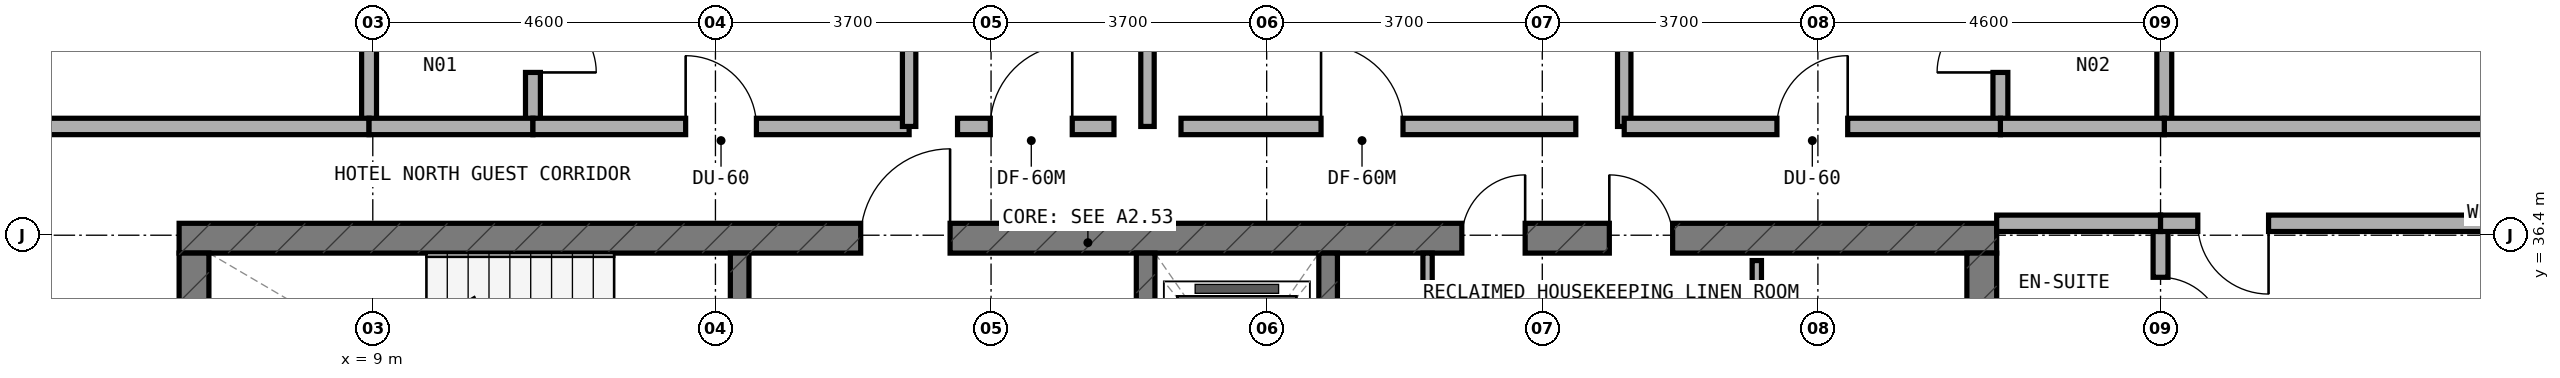
"""IFC4 building model, lengths in metres.
Left out: names, types, materials, properties, quantities, classifications, styles, units other than length and angle.
Written with IfcOpenShell. Run it as: python <this file> out.ifc"""

import sys

from ifc_helpers import new_model, si_unit, direction, frame, frame_2d, origin, place, context, subcontext, project, spatial, rectangle, extrude, element, fill, save


model = new_model("IFC4")
c1 = context("Model", 3, precision=1e-05, world=origin(), true_north=direction((0.0, 1.0)))
c2 = subcontext(c1, "Body", "Model", "MODEL_VIEW")
j1 = project(units=[si_unit("LENGTHUNIT", "METRE"), si_unit("PLANEANGLEUNIT", "RADIAN")], contexts=[c1])
p1 = place(None, origin())
s1 = spatial("IfcSite", under=j1, at=p1, CompositionType="ELEMENT")
p2 = place(p1, origin())
s2 = spatial("IfcBuilding", under=s1, at=p2, CompositionType="ELEMENT")
p3 = place(p2, frame((0.0, 0.0, 246.8)))
s3 = spatial("IfcBuildingStorey", under=s2, at=p3, CompositionType="ELEMENT", Elevation=246.8)
p4 = place(p3, frame((6.4, 36.36, 0.0), z_axis=(0.0, 0.0, 1.0), x_axis=(1.0, 0.0, 0.0)))
e1 = element("IfcWall", 1, at=p4, inside=s3, PredefinedType="SHEAR", context=c2, shape_type="SweptSolid", body=[
    extrude(rectangle(XDim=24.4, YDim=0.4, at=frame_2d((12.2, 0.0))), origin(), (0.0, 0.0, 1.0), 3.6),
])
p5 = place(p4, frame((9.15, 0.0, 0.0)))
e2 = element("IfcOpeningElement", 2, at=p5, cuts=e1, PredefinedType="OPENING", context=c2, shape_type="SweptSolid", body=[
    extrude(rectangle(XDim=1.2, YDim=2.15, at=frame_2d((0.6, 1.075))), frame((0.0, 0.21, 0.0), z_axis=(0.0, -1.0, 0.0), x_axis=(1.0, 0.0, 0.0)), (0.0, 0.0, 1.0), 0.42),
])
p6 = place(p4, frame((19.2, 0.0, 0.0)))
e3 = element("IfcOpeningElement", 3, at=p6, cuts=e1, PredefinedType="OPENING", context=c2, shape_type="SweptSolid", body=[
    extrude(rectangle(XDim=0.85, YDim=2.1, at=frame_2d((0.425, 1.05))), frame((0.0, 0.21, 0.0), z_axis=(0.0, -1.0, 0.0), x_axis=(1.0, 0.0, 0.0)), (0.0, 0.0, 1.0), 0.42),
])
p7 = place(p4, frame((17.22, 0.0, 0.0)))
e4 = element("IfcOpeningElement", 4, at=p7, cuts=e1, PredefinedType="OPENING", context=c2, shape_type="SweptSolid", body=[
    extrude(rectangle(XDim=0.85, YDim=2.1, at=frame_2d((0.425, 1.05))), frame((0.0, 0.21, 0.0), z_axis=(0.0, -1.0, 0.0), x_axis=(1.0, 0.0, 0.0)), (0.0, 0.0, 1.0), 0.42),
])
for number, where, z_axis, x_axis in (
    (5, (6.6, 33.0, 0.0), (0.0, 0.0, 1.0), (0.0, 1.0, 0.0)),
    (6, (30.6, 33.0, 0.0), (0.0, 0.0, 1.0), (0.0, 1.0, 0.0)),
):
    element("IfcWall", number, at=place(p3, frame(where, z_axis=z_axis, x_axis=x_axis)), inside=s3, PredefinedType="SHEAR", context=c2, shape_type="SweptSolid", body=[
        extrude(rectangle(XDim=3.16, YDim=0.4, at=frame_2d((1.58, 0.0))), origin(), (0.0, 0.0, 1.0), 3.6),
    ])
p8 = place(p3, frame((13.925, 33.0, 0.0), z_axis=(0.0, 0.0, 1.0), x_axis=(0.0, 1.0, 0.0)))
e7 = element("IfcWall", 7, at=p8, inside=s3, PredefinedType="STANDARD", context=c2, shape_type="SweptSolid", body=[
    extrude(rectangle(XDim=3.16, YDim=0.25, at=frame_2d((1.58, 0.0))), origin(), (0.0, 0.0, 1.0), 3.32),
])
p9 = place(p8, frame((0.98, 0.0, 0.0)))
e8 = element("IfcOpeningElement", 8, at=p9, cuts=e7, PredefinedType="OPENING", context=c2, shape_type="SweptSolid", body=[
    extrude(rectangle(XDim=1.1, YDim=2.15, at=frame_2d((0.55, 1.075))), frame((0.0, 0.135, 0.0), z_axis=(0.0, -1.0, 0.0), x_axis=(1.0, 0.0, 0.0)), (0.0, 0.0, 1.0), 0.27),
])
p10 = place(p3, frame((19.375, 33.0, 0.0), z_axis=(0.0, 0.0, 1.0), x_axis=(0.0, 1.0, 0.0)))
e9 = element("IfcWall", 9, at=p10, inside=s3, PredefinedType="STANDARD", context=c2, shape_type="SweptSolid", body=[
    extrude(rectangle(XDim=3.16, YDim=0.25, at=frame_2d((1.58, 0.0))), origin(), (0.0, 0.0, 1.0), 3.32),
])
p11 = place(p10, frame((0.98, 0.0, 0.0)))
e10 = element("IfcOpeningElement", 10, at=p11, cuts=e9, PredefinedType="OPENING", context=c2, shape_type="SweptSolid", body=[
    extrude(rectangle(XDim=1.1, YDim=2.15, at=frame_2d((0.55, 1.075))), frame((0.0, 0.135, 0.0), z_axis=(0.0, -1.0, 0.0), x_axis=(1.0, 0.0, 0.0)), (0.0, 0.0, 1.0), 0.27),
])
p12 = place(p3, frame((21.825, 33.0, 0.0), z_axis=(0.0, 0.0, 1.0), x_axis=(0.0, 1.0, 0.0)))
e11 = element("IfcWall", 11, at=p12, inside=s3, PredefinedType="STANDARD", context=c2, shape_type="SweptSolid", body=[
    extrude(rectangle(XDim=3.16, YDim=0.25, at=frame_2d((1.58, 0.0))), origin(), (0.0, 0.0, 1.0), 3.32),
])
p13 = place(p3, frame((27.58, 33.1, 0.0), z_axis=(0.0, 0.0, 1.0), x_axis=(0.0, 1.0, 0.0)))
e12 = element("IfcWall", 12, at=p13, inside=s3, PredefinedType="PARTITIONING", context=c2, shape_type="SweptSolid", body=[
    extrude(rectangle(XDim=2.96, YDim=0.125, at=frame_2d((1.48, 0.0))), origin(), (0.0, 0.0, 1.0), 3.32),
])
p14 = place(p13, frame((1.055, 0.0, 0.0)))
e13 = element("IfcOpeningElement", 13, at=p14, cuts=e12, PredefinedType="OPENING", context=c2, shape_type="SweptSolid", body=[
    extrude(rectangle(XDim=0.85, YDim=2.1, at=frame_2d((0.425, 1.05))), frame((0.0, 0.073, 0.0), z_axis=(0.0, -1.0, 0.0), x_axis=(1.0, 0.0, 0.0)), (0.0, 0.0, 1.0), 0.145),
])
p15 = place(p3, frame((23.16, 34.82, 0.0), z_axis=(0.0, 0.0, 1.0), x_axis=(0.0, 1.0, 0.0)))
e14 = element("IfcWall", 14, at=p15, inside=s3, PredefinedType="PARTITIONING", context=c2, shape_type="SweptSolid", body=[
    extrude(rectangle(XDim=1.34, YDim=0.125, at=frame_2d((0.67, 0.0))), origin(), (0.0, 0.0, 1.0), 3.32),
])
p16 = place(p3, frame((11.15, 37.96, 0.0), z_axis=(0.0, 0.0, 1.0), x_axis=(0.0, 1.0, 0.0)))
e15 = element("IfcWall", 15, at=p16, inside=s3, PredefinedType="PLUMBINGWALL", context=c2, shape_type="SweptSolid", body=[
    extrude(rectangle(XDim=2.1, YDim=0.2, at=frame_2d((1.05, 0.0))), origin(), (0.0, 0.0, 1.0), 3.025),
])
p17 = place(p16, frame((0.625, 0.0, 0.0)))
e16 = element("IfcOpeningElement", 16, at=p17, cuts=e15, PredefinedType="OPENING", context=c2, shape_type="SweptSolid", body=[
    extrude(rectangle(XDim=0.85, YDim=2.1, at=frame_2d((0.425, 1.05))), frame((0.0, 0.11, 0.0), z_axis=(0.0, -1.0, 0.0), x_axis=(1.0, 0.0, 0.0)), (0.0, 0.0, 1.0), 0.22),
])
p18 = place(p3, frame((8.95, 37.96, 0.0), z_axis=(0.0, 0.0, 1.0), x_axis=(0.0, 1.0, 0.0)))
e17 = element("IfcWall", 17, at=p18, inside=s3, PredefinedType="PLUMBINGWALL", context=c2, shape_type="SweptSolid", body=[
    extrude(rectangle(XDim=2.1, YDim=0.2, at=frame_2d((1.05, 0.0))), origin(), (0.0, 0.0, 1.0), 3.025),
])
p19 = place(p3, frame((2.76, 37.86, 0.0), z_axis=(0.0, 0.0, 1.0), x_axis=(1.0, 0.0, 0.0)))
e18 = element("IfcWall", 18, at=p19, inside=s3, PredefinedType="SOLIDWALL", context=c2, shape_type="SweptSolid", body=[
    extrude(rectangle(XDim=6.19, YDim=0.22, at=frame_2d((3.095, 0.0))), origin(), (0.0, 0.0, 1.0), 2.745),
])
p20 = place(p3, frame((8.95, 37.86, 0.0), z_axis=(0.0, 0.0, 1.0), x_axis=(1.0, 0.0, 0.0)))
e19 = element("IfcWall", 19, at=p20, inside=s3, PredefinedType="SOLIDWALL", context=c2, shape_type="SweptSolid", body=[
    extrude(rectangle(XDim=2.2, YDim=0.22, at=frame_2d((1.1, 0.0))), origin(), (0.0, 0.0, 1.0), 3.32),
])
p21 = place(p3, frame((11.15, 37.86, 0.0), z_axis=(0.0, 0.0, 1.0), x_axis=(1.0, 0.0, 0.0)))
e20 = element("IfcWall", 20, at=p21, inside=s3, PredefinedType="SOLIDWALL", context=c2, shape_type="SweptSolid", body=[
    extrude(rectangle(XDim=5.05, YDim=0.22, at=frame_2d((2.525, 0.0))), origin(), (0.0, 0.0, 1.0), 2.745),
])
p22 = place(p21, frame((2.05, 0.0, 0.0)))
e21 = element("IfcOpeningElement", 21, at=p22, cuts=e20, PredefinedType="OPENING", context=c2, shape_type="SweptSolid", body=[
    extrude(rectangle(XDim=0.95, YDim=2.1, at=frame_2d((0.475, 1.05))), frame((0.0, 0.12, 0.0), z_axis=(0.0, -1.0, 0.0), x_axis=(1.0, 0.0, 0.0)), (0.0, 0.0, 1.0), 0.24),
])
p23 = place(p3, frame((16.2, 37.86, 0.0), z_axis=(0.0, 0.0, 1.0), x_axis=(0.0, 1.0, 0.0)))
e22 = element("IfcWall", 22, at=p23, inside=s3, PredefinedType="SOLIDWALL", context=c2, shape_type="SweptSolid", body=[
    extrude(rectangle(XDim=5.68, YDim=0.18, at=frame_2d((2.84, 0.0))), origin(), (0.0, 0.0, 1.0), 2.745),
])
p24 = place(p3, frame((19.4, 37.86, 0.0), z_axis=(0.0, 0.0, 1.0), x_axis=(0.0, 1.0, 0.0)))
e23 = element("IfcWall", 23, at=p24, inside=s3, PredefinedType="SOLIDWALL", context=c2, shape_type="SweptSolid", body=[
    extrude(rectangle(XDim=5.68, YDim=0.18, at=frame_2d((2.84, 0.0))), origin(), (0.0, 0.0, 1.0), 3.015),
])
p25 = place(p3, frame((16.85, 37.86, 0.0), z_axis=(0.0, 0.0, 1.0), x_axis=(1.0, 0.0, 0.0)))
e24 = element("IfcWall", 24, at=p25, inside=s3, PredefinedType="SOLIDWALL", context=c2, shape_type="SweptSolid", body=[
    extrude(rectangle(XDim=2.1, YDim=0.22, at=frame_2d((1.05, 0.0))), origin(), (0.0, 0.0, 1.0), 3.32),
])
p26 = place(p25, frame((0.44, 0.0, 0.0)))
e25 = element("IfcOpeningElement", 25, at=p26, cuts=e24, PredefinedType="OPENING", context=c2, shape_type="SweptSolid", body=[
    extrude(rectangle(XDim=1.1, YDim=2.1, at=frame_2d((0.55, 1.05))), frame((0.0, 0.12, 0.0), z_axis=(0.0, -1.0, 0.0), x_axis=(1.0, 0.0, 0.0)), (0.0, 0.0, 1.0), 0.24),
])
p27 = place(p3, frame((19.85, 37.86, 0.0), z_axis=(0.0, 0.0, 1.0), x_axis=(1.0, 0.0, 0.0)))
e26 = element("IfcWall", 26, at=p27, inside=s3, PredefinedType="SOLIDWALL", context=c2, shape_type="SweptSolid", body=[
    extrude(rectangle(XDim=5.3, YDim=0.22, at=frame_2d((2.65, 0.0))), origin(), (0.0, 0.0, 1.0), 3.32),
])
p28 = place(p27, frame((1.88, 0.0, 0.0)))
e27 = element("IfcOpeningElement", 27, at=p28, cuts=e26, PredefinedType="OPENING", context=c2, shape_type="SweptSolid", body=[
    extrude(rectangle(XDim=1.1, YDim=2.1, at=frame_2d((0.55, 1.05))), frame((0.0, 0.12, 0.0), z_axis=(0.0, -1.0, 0.0), x_axis=(1.0, 0.0, 0.0)), (0.0, 0.0, 1.0), 0.24),
])
p29 = place(p3, frame((25.8, 37.86, 0.0), z_axis=(0.0, 0.0, 1.0), x_axis=(0.0, 1.0, 0.0)))
e28 = element("IfcWall", 28, at=p29, inside=s3, PredefinedType="SOLIDWALL", context=c2, shape_type="SweptSolid", body=[
    extrude(rectangle(XDim=5.68, YDim=0.18, at=frame_2d((2.84, 0.0))), origin(), (0.0, 0.0, 1.0), 2.745),
])
p30 = place(p3, frame((30.85, 37.96, 0.0), z_axis=(0.0, 0.0, 1.0), x_axis=(0.0, 1.0, 0.0)))
e29 = element("IfcWall", 29, at=p30, inside=s3, PredefinedType="PLUMBINGWALL", context=c2, shape_type="SweptSolid", body=[
    extrude(rectangle(XDim=2.1, YDim=0.2, at=frame_2d((1.05, 0.0))), origin(), (0.0, 0.0, 1.0), 3.025),
])
p31 = place(p30, frame((0.625, 0.0, 0.0)))
e30 = element("IfcOpeningElement", 30, at=p31, cuts=e29, PredefinedType="OPENING", context=c2, shape_type="SweptSolid", body=[
    extrude(rectangle(XDim=0.85, YDim=2.1, at=frame_2d((0.425, 1.05))), frame((0.0, 0.11, 0.0), z_axis=(0.0, -1.0, 0.0), x_axis=(1.0, 0.0, 0.0)), (0.0, 0.0, 1.0), 0.22),
])
p32 = place(p3, frame((33.05, 37.96, 0.0), z_axis=(0.0, 0.0, 1.0), x_axis=(0.0, 1.0, 0.0)))
e31 = element("IfcWall", 31, at=p32, inside=s3, PredefinedType="PLUMBINGWALL", context=c2, shape_type="SweptSolid", body=[
    extrude(rectangle(XDim=2.1, YDim=0.2, at=frame_2d((1.05, 0.0))), origin(), (0.0, 0.0, 1.0), 3.025),
])
p33 = place(p3, frame((33.05, 37.86, 0.0), z_axis=(0.0, 0.0, 1.0), x_axis=(1.0, 0.0, 0.0)))
e32 = element("IfcWall", 32, at=p33, inside=s3, PredefinedType="SOLIDWALL", context=c2, shape_type="SweptSolid", body=[
    extrude(rectangle(XDim=6.19, YDim=0.22, at=frame_2d((3.095, 0.0))), origin(), (0.0, 0.0, 1.0), 2.745),
])
p34 = place(p3, frame((30.85, 37.86, 0.0), z_axis=(0.0, 0.0, 1.0), x_axis=(1.0, 0.0, 0.0)))
e33 = element("IfcWall", 33, at=p34, inside=s3, PredefinedType="SOLIDWALL", context=c2, shape_type="SweptSolid", body=[
    extrude(rectangle(XDim=2.2, YDim=0.22, at=frame_2d((1.1, 0.0))), origin(), (0.0, 0.0, 1.0), 3.32),
])
p35 = place(p3, frame((25.8, 37.86, 0.0), z_axis=(0.0, 0.0, 1.0), x_axis=(1.0, 0.0, 0.0)))
e34 = element("IfcWall", 34, at=p35, inside=s3, PredefinedType="SOLIDWALL", context=c2, shape_type="SweptSolid", body=[
    extrude(rectangle(XDim=5.05, YDim=0.22, at=frame_2d((2.525, 0.0))), origin(), (0.0, 0.0, 1.0), 2.745),
])
p36 = place(p35, frame((2.05, 0.0, 0.0)))
e35 = element("IfcOpeningElement", 35, at=p36, cuts=e34, PredefinedType="OPENING", context=c2, shape_type="SweptSolid", body=[
    extrude(rectangle(XDim=0.95, YDim=2.1, at=frame_2d((0.475, 1.05))), frame((0.0, 0.12, 0.0), z_axis=(0.0, -1.0, 0.0), x_axis=(1.0, 0.0, 0.0)), (0.0, 0.0, 1.0), 0.24),
])
p37 = place(p3, frame((33.0, 34.36, 0.0), z_axis=(0.0, 0.0, 1.0), x_axis=(0.0, 1.0, 0.0)))
e36 = element("IfcWall", 36, at=p37, inside=s3, PredefinedType="PLUMBINGWALL", context=c2, shape_type="SweptSolid", body=[
    extrude(rectangle(XDim=2.1, YDim=0.2, at=frame_2d((1.05, 0.0))), origin(), (0.0, 0.0, 1.0), 3.32),
])
p38 = place(p37, frame((0.625, 0.0, 0.0)))
e37 = element("IfcOpeningElement", 37, at=p38, cuts=e36, PredefinedType="OPENING", context=c2, shape_type="SweptSolid", body=[
    extrude(rectangle(XDim=0.85, YDim=2.1, at=frame_2d((0.425, 1.05))), frame((0.0, 0.11, 0.0), z_axis=(0.0, -1.0, 0.0), x_axis=(1.0, 0.0, 0.0)), (0.0, 0.0, 1.0), 0.22),
])
p39 = place(p3, frame((30.8, 36.56, 0.0), z_axis=(0.0, 0.0, 1.0), x_axis=(1.0, 0.0, 0.0)))
e38 = element("IfcWall", 38, at=p39, inside=s3, PredefinedType="SOLIDWALL", context=c2, shape_type="SweptSolid", body=[
    extrude(rectangle(XDim=2.2, YDim=0.22, at=frame_2d((1.1, 0.0))), origin(), (0.0, 0.0, 1.0), 3.32),
])
p40 = place(p3, frame((33.0, 36.56, 0.0), z_axis=(0.0, 0.0, 1.0), x_axis=(1.0, 0.0, 0.0)))
e39 = element("IfcWall", 39, at=p40, inside=s3, PredefinedType="SOLIDWALL", context=c2, shape_type="SweptSolid", body=[
    extrude(rectangle(XDim=6.4, YDim=0.22, at=frame_2d((3.2, 0.0))), origin(), (0.0, 0.0, 1.0), 2.745),
])
p41 = place(p40, frame((0.5, 0.0, 0.0)))
e40 = element("IfcOpeningElement", 40, at=p41, cuts=e39, PredefinedType="OPENING", context=c2, shape_type="SweptSolid", body=[
    extrude(rectangle(XDim=0.95, YDim=2.1, at=frame_2d((0.475, 1.05))), frame((0.0, 0.12, 0.0), z_axis=(0.0, -1.0, 0.0), x_axis=(1.0, 0.0, 0.0)), (0.0, 0.0, 1.0), 0.24),
])
p42 = place(p5, origin())
e41 = element("IfcDoor", 41, at=p42, inside=s3, OperationType="SINGLE_SWING_RIGHT", PredefinedType="DOOR", context=c2, shape_type="SweptSolid", body=[
    extrude(rectangle(XDim=1.2, YDim=2.15, at=frame_2d((0.6, 1.075))), frame((0.0, 0.025, 0.0), z_axis=(0.0, -1.0, 0.0), x_axis=(1.0, 0.0, 0.0)), (0.0, 0.0, 1.0), 0.05),
])
fill(e2, e41)
p43 = place(p6, origin())
e42 = element("IfcDoor", 42, at=p43, inside=s3, OperationType="SINGLE_SWING_LEFT", PredefinedType="DOOR", context=c2, shape_type="SweptSolid", body=[
    extrude(rectangle(XDim=0.85, YDim=2.1, at=frame_2d((0.425, 1.05))), frame((0.0, 0.025, 0.0), z_axis=(0.0, -1.0, 0.0), x_axis=(1.0, 0.0, 0.0)), (0.0, 0.0, 1.0), 0.05),
])
fill(e3, e42)
p44 = place(p7, origin())
e43 = element("IfcDoor", 43, at=p44, inside=s3, OperationType="SINGLE_SWING_RIGHT", PredefinedType="DOOR", context=c2, shape_type="SweptSolid", body=[
    extrude(rectangle(XDim=0.85, YDim=2.1, at=frame_2d((0.425, 1.05))), frame((0.0, 0.025, 0.0), z_axis=(0.0, -1.0, 0.0), x_axis=(1.0, 0.0, 0.0)), (0.0, 0.0, 1.0), 0.05),
])
fill(e4, e43)
p45 = place(p17, frame((0.85, 0.0, 0.0), z_axis=(0.0, 0.0, 1.0), x_axis=(-1.0, 0.0, 0.0)))
e44 = element("IfcDoor", 44, at=p45, inside=s3, OperationType="SINGLE_SWING_RIGHT", PredefinedType="DOOR", context=c2, shape_type="SweptSolid", body=[
    extrude(rectangle(XDim=0.85, YDim=2.1, at=frame_2d((0.425, 1.05))), frame((0.0, 0.025, 0.0), z_axis=(0.0, -1.0, 0.0), x_axis=(1.0, 0.0, 0.0)), (0.0, 0.0, 1.0), 0.05),
])
fill(e16, e44)
p46 = place(p22, origin())
e45 = element("IfcDoor", 45, at=p46, inside=s3, OperationType="SINGLE_SWING_LEFT", PredefinedType="DOOR", context=c2, shape_type="SweptSolid", body=[
    extrude(rectangle(XDim=0.95, YDim=2.1, at=frame_2d((0.475, 1.05))), frame((0.0, 0.025, 0.0), z_axis=(0.0, -1.0, 0.0), x_axis=(1.0, 0.0, 0.0)), (0.0, 0.0, 1.0), 0.05),
])
fill(e21, e45)
p47 = place(p26, origin())
e46 = element("IfcDoor", 46, at=p47, inside=s3, OperationType="SINGLE_SWING_RIGHT", PredefinedType="DOOR", context=c2, shape_type="SweptSolid", body=[
    extrude(rectangle(XDim=1.1, YDim=2.1, at=frame_2d((0.55, 1.05))), frame((0.0, 0.025, 0.0), z_axis=(0.0, -1.0, 0.0), x_axis=(1.0, 0.0, 0.0)), (0.0, 0.0, 1.0), 0.05),
])
fill(e25, e46)
p48 = place(p28, origin())
e47 = element("IfcDoor", 47, at=p48, inside=s3, OperationType="SINGLE_SWING_LEFT", PredefinedType="DOOR", context=c2, shape_type="SweptSolid", body=[
    extrude(rectangle(XDim=1.1, YDim=2.1, at=frame_2d((0.55, 1.05))), frame((0.0, 0.025, 0.0), z_axis=(0.0, -1.0, 0.0), x_axis=(1.0, 0.0, 0.0)), (0.0, 0.0, 1.0), 0.05),
])
fill(e27, e47)
p49 = place(p31, origin())
e48 = element("IfcDoor", 48, at=p49, inside=s3, OperationType="SINGLE_SWING_LEFT", PredefinedType="DOOR", context=c2, shape_type="SweptSolid", body=[
    extrude(rectangle(XDim=0.85, YDim=2.1, at=frame_2d((0.425, 1.05))), frame((0.0, 0.025, 0.0), z_axis=(0.0, -1.0, 0.0), x_axis=(1.0, 0.0, 0.0)), (0.0, 0.0, 1.0), 0.05),
])
fill(e30, e48)
p50 = place(p36, origin())
e49 = element("IfcDoor", 49, at=p50, inside=s3, OperationType="SINGLE_SWING_RIGHT", PredefinedType="DOOR", context=c2, shape_type="SweptSolid", body=[
    extrude(rectangle(XDim=0.95, YDim=2.1, at=frame_2d((0.475, 1.05))), frame((0.0, 0.025, 0.0), z_axis=(0.0, -1.0, 0.0), x_axis=(1.0, 0.0, 0.0)), (0.0, 0.0, 1.0), 0.05),
])
fill(e35, e49)
p51 = place(p38, frame((0.85, 0.0, 0.0), z_axis=(0.0, 0.0, 1.0), x_axis=(-1.0, 0.0, 0.0)))
e50 = element("IfcDoor", 50, at=p51, inside=s3, OperationType="SINGLE_SWING_RIGHT", PredefinedType="DOOR", context=c2, shape_type="SweptSolid", body=[
    extrude(rectangle(XDim=0.85, YDim=2.1, at=frame_2d((0.425, 1.05))), frame((0.0, 0.025, 0.0), z_axis=(0.0, -1.0, 0.0), x_axis=(1.0, 0.0, 0.0)), (0.0, 0.0, 1.0), 0.05),
])
fill(e37, e50)
p52 = place(p41, frame((0.95, 0.0, 0.0), z_axis=(0.0, 0.0, 1.0), x_axis=(-1.0, 0.0, 0.0)))
e51 = element("IfcDoor", 51, at=p52, inside=s3, OperationType="SINGLE_SWING_LEFT", PredefinedType="DOOR", context=c2, shape_type="SweptSolid", body=[
    extrude(rectangle(XDim=0.95, YDim=2.1, at=frame_2d((0.475, 1.05))), frame((0.0, 0.025, 0.0), z_axis=(0.0, -1.0, 0.0), x_axis=(1.0, 0.0, 0.0)), (0.0, 0.0, 1.0), 0.05),
])
fill(e40, e51)
save(model, sys.argv[1])
